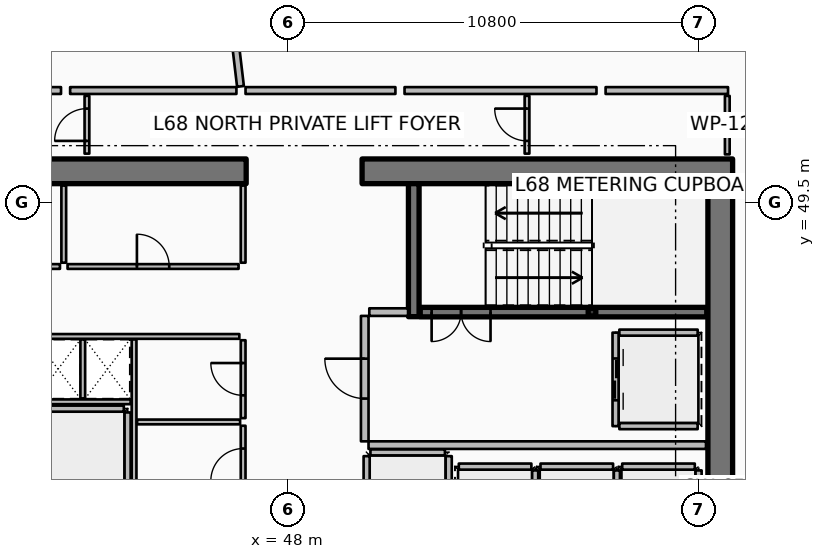
"""IFC4 building model, lengths in metres.
Left out: names, types, materials, properties, quantities, classifications, styles, units other than length and angle.
Written with IfcOpenShell. Run it as: python <this file> out.ifc"""

import sys

from ifc_helpers import new_model, si_unit, direction, frame, frame_2d, origin, origin_2d, place, context, subcontext, project, spatial, rectangle, hollow_rectangle, extrude, element, fill, save


model = new_model("IFC4")
c1 = context("Model", 3, precision=1e-05, world=origin(), true_north=direction((0.0, 1.0)))
c2 = subcontext(c1, "Body", "Model", "MODEL_VIEW")
j1 = project(units=[si_unit("LENGTHUNIT", "METRE"), si_unit("PLANEANGLEUNIT", "RADIAN")], contexts=[c1])
p1 = place(None, origin())
s1 = spatial("IfcSite", under=j1, at=p1, CompositionType="ELEMENT")
p2 = place(p1, origin())
s2 = spatial("IfcBuilding", under=s1, at=p2, CompositionType="ELEMENT")
p3 = place(p2, frame((0.0, 0.0, 271.35)))
s3 = spatial("IfcBuildingStorey", under=s2, at=p3, CompositionType="ELEMENT", Elevation=271.35)
for number, where, z_axis, x_axis in (
    (1, (37.15, 50.325, 0.0), (0.0, 0.0, 1.0), (1.0, 0.0, 0.0)),
    (2, (49.95, 50.325, 0.0), (0.0, 0.0, 1.0), (1.0, 0.0, 0.0)),
):
    element("IfcWall", number, at=place(p3, frame(where, z_axis=z_axis, x_axis=x_axis)), inside=s3, PredefinedType="SHEAR", context=c2, shape_type="SweptSolid", body=[
        extrude(rectangle(XDim=9.75, YDim=0.65, at=frame_2d((4.875, 0.0))), origin(), (0.0, 0.0, 1.0), 3.85),
    ])
p4 = place(p3, frame((59.375, 34.0, 0.0), z_axis=(0.0, 0.0, 1.0), x_axis=(0.0, 1.0, 0.0)))
e3 = element("IfcWall", 3, at=p4, inside=s3, PredefinedType="SHEAR", context=c2, shape_type="SweptSolid", body=[
    extrude(rectangle(XDim=16.0, YDim=0.65, at=frame_2d((8.0, 0.0))), origin(), (0.0, 0.0, 1.0), 3.85),
])
p5 = place(p3, frame((51.31, 46.5, 0.0), z_axis=(0.0, 0.0, 1.0), x_axis=(0.0, 1.0, 0.0)))
e4 = element("IfcWall", 4, at=p5, inside=s3, PredefinedType="SHEAR", context=c2, shape_type="SweptSolid", body=[
    extrude(rectangle(XDim=3.5, YDim=0.28, at=frame_2d((1.75, 0.0))), origin(), (0.0, 0.0, 1.0), 3.85),
])
p6 = place(p3, frame((56.0, 46.62, 0.0), z_axis=(0.0, 0.0, 1.0), x_axis=(1.0, 0.0, 0.0)))
e5 = element("IfcColumn", 5, at=p6, inside=s3, PredefinedType="COLUMN", context=c2, shape_type="SweptSolid", body=[
    extrude(hollow_rectangle(XDim=0.2, YDim=0.2, WallThickness=0.01, InnerFilletRadius=0.01, OuterFilletRadius=0.02, at=origin_2d()), origin(), (0.0, 0.0, 1.0), 1.72),
])
p7 = place(p3, frame((51.48, 46.62, 0.0), z_axis=(0.0, 0.0, 1.0), x_axis=(1.0, 0.0, 0.0)))
e6 = element("IfcWall", 6, at=p7, inside=s3, PredefinedType="SOLIDWALL", context=c2, shape_type="SweptSolid", body=[
    extrude(rectangle(XDim=7.54, YDim=0.25, at=frame_2d((3.77, 0.0))), origin(), (0.0, 0.0, 1.0), 3.59),
])
p8 = place(p7, frame((0.3, 0.0, 0.0)))
e7 = element("IfcOpeningElement", 7, at=p8, cuts=e6, PredefinedType="OPENING", context=c2, shape_type="SweptSolid", body=[
    extrude(rectangle(XDim=1.55, YDim=2.15, at=frame_2d((0.775, 1.075))), frame((0.0, 0.135, 0.0), z_axis=(0.0, -1.0, 0.0), x_axis=(1.0, 0.0, 0.0)), (0.0, 0.0, 1.0), 0.27),
])
p9 = place(p3, frame((54.505, 40.845, 0.0), z_axis=(0.0, 0.0, 1.0), x_axis=(0.0, 1.0, 0.0)))
e8 = element("IfcWall", 8, at=p9, inside=s3, PredefinedType="PARTITIONING", context=c2, shape_type="SweptSolid", body=[
    extrude(rectangle(XDim=1.61, YDim=0.16, at=frame_2d((0.805, 0.0))), origin(), (0.0, 0.0, 1.0), 3.59),
])
p10 = place(p3, frame((52.495, 42.555, 0.0), z_axis=(0.0, 0.0, 1.0), x_axis=(1.0, 0.0, 0.0)))
e9 = element("IfcWall", 9, at=p10, inside=s3, PredefinedType="PARTITIONING", context=c2, shape_type="SweptSolid", body=[
    extrude(rectangle(XDim=1.91, YDim=0.16, at=frame_2d((0.955, 0.0))), origin(), (0.0, 0.0, 1.0), 3.59),
])
p11 = place(p3, frame((56.655, 40.845, 0.0), z_axis=(0.0, 0.0, 1.0), x_axis=(0.0, 1.0, 0.0)))
e10 = element("IfcWall", 10, at=p11, inside=s3, PredefinedType="PARTITIONING", context=c2, shape_type="SweptSolid", body=[
    extrude(rectangle(XDim=1.61, YDim=0.16, at=frame_2d((0.805, 0.0))), origin(), (0.0, 0.0, 1.0), 3.59),
])
p12 = place(p3, frame((54.645, 42.555, 0.0), z_axis=(0.0, 0.0, 1.0), x_axis=(1.0, 0.0, 0.0)))
e11 = element("IfcWall", 11, at=p12, inside=s3, PredefinedType="PARTITIONING", context=c2, shape_type="SweptSolid", body=[
    extrude(rectangle(XDim=1.91, YDim=0.16, at=frame_2d((0.955, 0.0))), origin(), (0.0, 0.0, 1.0), 3.59),
])
p13 = place(p3, frame((58.805, 40.845, 0.0), z_axis=(0.0, 0.0, 1.0), x_axis=(0.0, 1.0, 0.0)))
e12 = element("IfcWall", 12, at=p13, inside=s3, PredefinedType="PARTITIONING", context=c2, shape_type="SweptSolid", body=[
    extrude(rectangle(XDim=1.61, YDim=0.16, at=frame_2d((0.805, 0.0))), origin(), (0.0, 0.0, 1.0), 3.59),
])
p14 = place(p3, frame((56.795, 42.555, 0.0), z_axis=(0.0, 0.0, 1.0), x_axis=(1.0, 0.0, 0.0)))
e13 = element("IfcWall", 13, at=p14, inside=s3, PredefinedType="PARTITIONING", context=c2, shape_type="SweptSolid", body=[
    extrude(rectangle(XDim=1.91, YDim=0.16, at=frame_2d((0.955, 0.0))), origin(), (0.0, 0.0, 1.0), 3.59),
])
p15 = place(p3, frame((43.78, 41.72, 0.0), z_axis=(0.0, 0.0, 1.0), x_axis=(0.0, 1.0, 0.0)))
e14 = element("IfcWall", 14, at=p15, inside=s3, PredefinedType="PARTITIONING", context=c2, shape_type="SweptSolid", body=[
    extrude(rectangle(XDim=2.26, YDim=0.16, at=frame_2d((1.13, 0.0))), origin(), (0.0, 0.0, 1.0), 3.59),
])
p16 = place(p3, frame((41.62, 44.08, 0.0), z_axis=(0.0, 0.0, 1.0), x_axis=(1.0, 0.0, 0.0)))
e15 = element("IfcWall", 15, at=p16, inside=s3, PredefinedType="PARTITIONING", context=c2, shape_type="SweptSolid", body=[
    extrude(rectangle(XDim=2.06, YDim=0.16, at=frame_2d((1.03, 0.0))), origin(), (0.0, 0.0, 1.0), 3.59),
])
p17 = place(p3, frame((56.62, 46.08, 0.0), z_axis=(0.0, 0.0, 1.0), x_axis=(0.0, -1.0, 0.0)))
e16 = element("IfcWall", 16, at=p17, inside=s3, PredefinedType="PARTITIONING", context=c2, shape_type="SweptSolid", body=[
    extrude(rectangle(XDim=2.46, YDim=0.16, at=frame_2d((1.23, 0.0))), origin(), (0.0, 0.0, 1.0), 3.59),
])
p18 = place(p17, frame((0.68, 0.0, 0.0)))
e17 = element("IfcOpeningElement", 17, at=p18, cuts=e16, PredefinedType="OPENING", context=c2, shape_type="SweptSolid", body=[
    extrude(rectangle(XDim=1.1, YDim=2.1, at=frame_2d((0.55, 1.05))), frame((0.0, 0.09, 0.0), z_axis=(0.0, -1.0, 0.0), x_axis=(1.0, 0.0, 0.0)), (0.0, 0.0, 1.0), 0.18),
])
for number, where, z_axis, x_axis in (
    (18, (56.72, 46.08, 0.0), (0.0, 0.0, 1.0), (1.0, 0.0, 0.0)),
    (19, (56.72, 43.62, 0.0), (0.0, 0.0, 1.0), (1.0, 0.0, 0.0)),
):
    element("IfcWall", number, at=place(p3, frame(where, z_axis=z_axis, x_axis=x_axis)), inside=s3, PredefinedType="PARTITIONING", context=c2, shape_type="SweptSolid", body=[
        extrude(rectangle(XDim=2.06, YDim=0.16, at=frame_2d((1.03, 0.0))), origin(), (0.0, 0.0, 1.0), 3.59),
    ])
for number, where, z_axis, x_axis in (
    (20, (52.23, 40.67, 0.0), (0.0, 0.0, 1.0), (0.0, 1.0, 0.0)),
    (21, (50.07, 40.67, 0.0), (0.0, 0.0, 1.0), (0.0, 1.0, 0.0)),
):
    element("IfcWall", number, at=place(p3, frame(where, z_axis=z_axis, x_axis=x_axis)), inside=s3, PredefinedType="PARTITIONING", context=c2, shape_type="SweptSolid", body=[
        extrude(rectangle(XDim=2.16, YDim=0.16, at=frame_2d((1.08, 0.0))), origin(), (0.0, 0.0, 1.0), 3.59),
    ])
p19 = place(p3, frame((50.17, 42.93, 0.0), z_axis=(0.0, 0.0, 1.0), x_axis=(1.0, 0.0, 0.0)))
e22 = element("IfcWall", 22, at=p19, inside=s3, PredefinedType="PARTITIONING", context=c2, shape_type="SweptSolid", body=[
    extrude(rectangle(XDim=1.96, YDim=0.16, at=frame_2d((0.98, 0.0))), origin(), (0.0, 0.0, 1.0), 3.59),
])
for number, where, z_axis, x_axis in (
    (23, (46.82, 47.92, 0.0), (0.0, 0.0, 1.0), (0.0, 1.0, 0.0)),
    (24, (42.1, 47.92, 0.0), (0.0, 0.0, 1.0), (0.0, 1.0, 0.0)),
):
    element("IfcWall", number, at=place(p3, frame(where, z_axis=z_axis, x_axis=x_axis)), inside=s3, PredefinedType="PARTITIONING", context=c2, shape_type="SweptSolid", body=[
        extrude(rectangle(XDim=2.03, YDim=0.125, at=frame_2d((1.015, 0.0))), origin(), (0.0, 0.0, 1.0), 3.03),
    ])
p20 = place(p3, frame((37.92, 47.82, 0.0), z_axis=(0.0, 0.0, 1.0), x_axis=(1.0, 0.0, 0.0)))
e25 = element("IfcWall", 25, at=p20, inside=s3, PredefinedType="PARTITIONING", context=c2, shape_type="SweptSolid", body=[
    extrude(rectangle(XDim=4.08, YDim=0.125, at=frame_2d((2.04, 0.0))), origin(), (0.0, 0.0, 1.0), 3.03),
])
p21 = place(p20, frame((1.615, 0.0, 0.0)))
e26 = element("IfcOpeningElement", 26, at=p21, cuts=e25, PredefinedType="OPENING", context=c2, shape_type="SweptSolid", body=[
    extrude(rectangle(XDim=0.85, YDim=2.06, at=frame_2d((0.425, 1.03))), frame((0.0, 0.073, 0.0), z_axis=(0.0, -1.0, 0.0), x_axis=(1.0, 0.0, 0.0)), (0.0, 0.0, 1.0), 0.145),
])
p22 = place(p3, frame((42.2, 47.82, 0.0), z_axis=(0.0, 0.0, 1.0), x_axis=(1.0, 0.0, 0.0)))
e27 = element("IfcWall", 27, at=p22, inside=s3, PredefinedType="PARTITIONING", context=c2, shape_type="SweptSolid", body=[
    extrude(rectangle(XDim=4.5, YDim=0.125, at=frame_2d((2.25, 0.0))), origin(), (0.0, 0.0, 1.0), 3.03),
])
p23 = place(p22, frame((1.825, 0.0, 0.0)))
e28 = element("IfcOpeningElement", 28, at=p23, cuts=e27, PredefinedType="OPENING", context=c2, shape_type="SweptSolid", body=[
    extrude(rectangle(XDim=0.85, YDim=2.06, at=frame_2d((0.425, 1.03))), frame((0.0, 0.073, 0.0), z_axis=(0.0, -1.0, 0.0), x_axis=(1.0, 0.0, 0.0)), (0.0, 0.0, 1.0), 0.145),
])
p24 = place(p3, frame((50.12, 43.12, 0.0), z_axis=(0.0, 0.0, 1.0), x_axis=(1.0, 0.0, 0.0)))
e29 = element("IfcWall", 29, at=p24, inside=s3, PredefinedType="PARTITIONING", context=c2, shape_type="SweptSolid", body=[
    extrude(rectangle(XDim=8.88, YDim=0.2, at=frame_2d((4.44, 0.0))), origin(), (0.0, 0.0, 1.0), 3.59),
])
p25 = place(p3, frame((50.14, 46.62, 0.0), z_axis=(0.0, 0.0, 1.0), x_axis=(1.0, 0.0, 0.0)))
e30 = element("IfcWall", 30, at=p25, inside=s3, PredefinedType="PARTITIONING", context=c2, shape_type="SweptSolid", body=[
    extrude(rectangle(XDim=1.02, YDim=0.2, at=frame_2d((0.51, 0.0))), origin(), (0.0, 0.0, 1.0), 3.59),
])
p26 = place(p3, frame((50.02, 43.22, 0.0), z_axis=(0.0, 0.0, 1.0), x_axis=(0.0, 1.0, 0.0)))
e31 = element("IfcWall", 31, at=p26, inside=s3, PredefinedType="PARTITIONING", context=c2, shape_type="SweptSolid", body=[
    extrude(rectangle(XDim=3.3, YDim=0.2, at=frame_2d((1.65, 0.0))), origin(), (0.0, 0.0, 1.0), 3.59),
])
p27 = place(p26, frame((1.125, 0.0, 0.0)))
e32 = element("IfcOpeningElement", 32, at=p27, cuts=e31, PredefinedType="OPENING", context=c2, shape_type="SweptSolid", body=[
    extrude(rectangle(XDim=1.05, YDim=2.1, at=frame_2d((0.525, 1.05))), frame((0.0, 0.11, 0.0), z_axis=(0.0, -1.0, 0.0), x_axis=(1.0, 0.0, 0.0)), (0.0, 0.0, 1.0), 0.22),
])
p28 = place(p3, frame((41.36, 45.98, 0.0), z_axis=(0.0, 0.0, 1.0), x_axis=(1.0, 0.0, 0.0)))
e33 = element("IfcWall", 33, at=p28, inside=s3, PredefinedType="PARTITIONING", context=c2, shape_type="SweptSolid", body=[
    extrude(rectangle(XDim=5.36, YDim=0.125, at=frame_2d((2.68, 0.0))), origin(), (0.0, 0.0, 1.0), 3.03),
])
p29 = place(p3, frame((41.36, 44.26, 0.0), z_axis=(0.0, 0.0, 1.0), x_axis=(1.0, 0.0, 0.0)))
e34 = element("IfcWall", 34, at=p29, inside=s3, PredefinedType="PARTITIONING", context=c2, shape_type="SweptSolid", body=[
    extrude(rectangle(XDim=2.5, YDim=0.125, at=frame_2d((1.25, 0.0))), origin(), (0.0, 0.0, 1.0), 3.03),
])
p30 = place(p3, frame((42.6, 44.35, 0.0), z_axis=(0.0, 0.0, 1.0), x_axis=(0.0, 1.0, 0.0)))
e35 = element("IfcWall", 35, at=p30, inside=s3, PredefinedType="PARTITIONING", context=c2, shape_type="SweptSolid", body=[
    extrude(rectangle(XDim=1.55, YDim=0.125, at=frame_2d((0.775, 0.0))), origin(), (0.0, 0.0, 1.0), 3.03),
])
p31 = place(p3, frame((43.95, 41.58, 0.0), z_axis=(0.0, 0.0, 1.0), x_axis=(0.0, 1.0, 0.0)))
e36 = element("IfcWall", 36, at=p31, inside=s3, PredefinedType="PARTITIONING", context=c2, shape_type="SweptSolid", body=[
    extrude(rectangle(XDim=4.32, YDim=0.125, at=frame_2d((2.16, 0.0))), origin(), (0.0, 0.0, 1.0), 3.03),
])
p32 = place(p3, frame((44.03, 43.73, 0.0), z_axis=(0.0, 0.0, 1.0), x_axis=(1.0, 0.0, 0.0)))
e37 = element("IfcWall", 37, at=p32, inside=s3, PredefinedType="PARTITIONING", context=c2, shape_type="SweptSolid", body=[
    extrude(rectangle(XDim=2.71, YDim=0.125, at=frame_2d((1.355, 0.0))), origin(), (0.0, 0.0, 1.0), 3.03),
])
p33 = place(p3, frame((46.82, 41.58, 0.0), z_axis=(0.0, 0.0, 1.0), x_axis=(0.0, 1.0, 0.0)))
e38 = element("IfcWall", 38, at=p33, inside=s3, PredefinedType="PARTITIONING", context=c2, shape_type="SweptSolid", body=[
    extrude(rectangle(XDim=2.05, YDim=0.125, at=frame_2d((1.025, 0.0))), origin(), (0.0, 0.0, 1.0), 3.03),
])
p34 = place(p33, frame((0.6, 0.0, 0.0)))
e39 = element("IfcOpeningElement", 39, at=p34, cuts=e38, PredefinedType="OPENING", context=c2, shape_type="SweptSolid", body=[
    extrude(rectangle(XDim=0.85, YDim=2.06, at=frame_2d((0.425, 1.03))), frame((0.0, 0.073, 0.0), z_axis=(0.0, -1.0, 0.0), x_axis=(1.0, 0.0, 0.0)), (0.0, 0.0, 1.0), 0.145),
])
p35 = place(p3, frame((46.82, 43.83, 0.0), z_axis=(0.0, 0.0, 1.0), x_axis=(0.0, 1.0, 0.0)))
e40 = element("IfcWall", 40, at=p35, inside=s3, PredefinedType="PARTITIONING", context=c2, shape_type="SweptSolid", body=[
    extrude(rectangle(XDim=2.05, YDim=0.125, at=frame_2d((1.025, 0.0))), origin(), (0.0, 0.0, 1.0), 3.03),
])
p36 = place(p35, frame((0.6, 0.0, 0.0)))
e41 = element("IfcOpeningElement", 41, at=p36, cuts=e40, PredefinedType="OPENING", context=c2, shape_type="SweptSolid", body=[
    extrude(rectangle(XDim=0.85, YDim=2.06, at=frame_2d((0.425, 1.03))), frame((0.0, 0.073, 0.0), z_axis=(0.0, -1.0, 0.0), x_axis=(1.0, 0.0, 0.0)), (0.0, 0.0, 1.0), 0.145),
])
p37 = place(p3, frame((59.56, 50.77, 0.0), z_axis=(0.0, 0.0, 1.0), x_axis=(0.0, 1.0, 0.0)))
e42 = element("IfcWall", 42, at=p37, inside=s3, PredefinedType="PARTITIONING", context=c2, shape_type="SweptSolid", body=[
    extrude(rectangle(XDim=1.54, YDim=0.125, at=frame_2d((0.77, 0.0))), origin(), (0.0, 0.0, 1.0), 3.03),
])
p38 = place(p3, frame((42.71, 50.79, 0.0), z_axis=(0.0, 0.0, 1.0), x_axis=(0.0, 1.0, 0.0)))
e43 = element("IfcWall", 43, at=p38, inside=s3, PredefinedType="PARTITIONING", context=c2, shape_type="SweptSolid", body=[
    extrude(rectangle(XDim=1.52, YDim=0.125, at=frame_2d((0.76, 0.0))), origin(), (0.0, 0.0, 1.0), 2.957),
])
p39 = place(p38, frame((0.335, 0.0, 0.0)))
e44 = element("IfcOpeningElement", 44, at=p39, cuts=e43, PredefinedType="OPENING", context=c2, shape_type="SweptSolid", body=[
    extrude(rectangle(XDim=0.85, YDim=2.06, at=frame_2d((0.425, 1.03))), frame((0.0, 0.073, 0.0), z_axis=(0.0, -1.0, 0.0), x_axis=(1.0, 0.0, 0.0)), (0.0, 0.0, 1.0), 0.145),
])
p40 = place(p3, frame((54.29, 50.79, 0.0), z_axis=(0.0, 0.0, 1.0), x_axis=(0.0, 1.0, 0.0)))
e45 = element("IfcWall", 45, at=p40, inside=s3, PredefinedType="PARTITIONING", context=c2, shape_type="SweptSolid", body=[
    extrude(rectangle(XDim=1.52, YDim=0.125, at=frame_2d((0.76, 0.0))), origin(), (0.0, 0.0, 1.0), 3.03),
])
p41 = place(p40, frame((0.335, 0.0, 0.0)))
e46 = element("IfcOpeningElement", 46, at=p41, cuts=e45, PredefinedType="OPENING", context=c2, shape_type="SweptSolid", body=[
    extrude(rectangle(XDim=0.85, YDim=2.06, at=frame_2d((0.425, 1.03))), frame((0.0, 0.073, 0.0), z_axis=(0.0, -1.0, 0.0), x_axis=(1.0, 0.0, 0.0)), (0.0, 0.0, 1.0), 0.145),
])
p42 = place(p3, frame((46.75, 52.559, 0.0), z_axis=(0.0, 0.0, 1.0), x_axis=(-0.117540318076, 0.993068111273, 0.0)))
e47 = element("IfcWall", 47, at=p42, inside=s3, PredefinedType="PARTITIONING", context=c2, shape_type="SweptSolid", body=[
    extrude(rectangle(XDim=14.062, YDim=0.18, at=frame_2d((7.031, 0.0))), origin(), (0.0, 0.0, 1.0), 2.957),
])
p43 = place(p3, frame((46.643, 52.45, 0.0), z_axis=(0.0, 0.0, 1.0), x_axis=(-1.0, 0.0, 0.0)))
e48 = element("IfcWall", 48, at=p43, inside=s3, PredefinedType="PARTITIONING", context=c2, shape_type="SweptSolid", body=[
    extrude(rectangle(XDim=4.376, YDim=0.18, at=frame_2d((2.188, 0.0))), origin(), (0.0, 0.0, 1.0), 2.957),
])
p44 = place(p3, frame((42.028, 52.45, 0.0), z_axis=(0.0, 0.0, 1.0), x_axis=(-1.0, 0.0, 0.0)))
e49 = element("IfcWall", 49, at=p44, inside=s3, PredefinedType="PARTITIONING", context=c2, shape_type="SweptSolid", body=[
    extrude(rectangle(XDim=4.758, YDim=0.18, at=frame_2d((2.379, 0.0))), origin(), (0.0, 0.0, 1.0), 2.957),
])
p45 = place(p3, frame((59.58, 52.45, 0.0), z_axis=(0.0, 0.0, 1.0), x_axis=(-1.0, 0.0, 0.0)))
e50 = element("IfcWall", 50, at=p45, inside=s3, PredefinedType="PARTITIONING", context=c2, shape_type="SweptSolid", body=[
    extrude(rectangle(XDim=3.222, YDim=0.18, at=frame_2d((1.611, 0.0))), origin(), (0.0, 0.0, 1.0), 2.957),
])
p46 = place(p3, frame((56.118, 52.45, 0.0), z_axis=(0.0, 0.0, 1.0), x_axis=(-1.0, 0.0, 0.0)))
e51 = element("IfcWall", 51, at=p46, inside=s3, PredefinedType="PARTITIONING", context=c2, shape_type="SweptSolid", body=[
    extrude(rectangle(XDim=5.051, YDim=0.18, at=frame_2d((2.525, 0.0))), origin(), (0.0, 0.0, 1.0), 2.957),
])
p47 = place(p3, frame((50.827, 52.45, 0.0), z_axis=(0.0, 0.0, 1.0), x_axis=(-1.0, 0.0, 0.0)))
e52 = element("IfcWall", 52, at=p47, inside=s3, PredefinedType="PARTITIONING", context=c2, shape_type="SweptSolid", body=[
    extrude(rectangle(XDim=3.944, YDim=0.18, at=frame_2d((1.972, 0.0))), origin(), (0.0, 0.0, 1.0), 2.957),
])
p48 = place(p8, origin())
e53 = element("IfcDoor", 53, at=p48, inside=s3, OperationType="DOUBLE_DOOR_SINGLE_SWING", PredefinedType="DOOR", context=c2, shape_type="SweptSolid", body=[
    extrude(rectangle(XDim=1.55, YDim=2.15, at=frame_2d((0.775, 1.075))), frame((0.0, 0.025, 0.0), z_axis=(0.0, -1.0, 0.0), x_axis=(1.0, 0.0, 0.0)), (0.0, 0.0, 1.0), 0.05),
])
fill(e7, e53)
p49 = place(p18, origin())
e54 = element("IfcDoor", 54, at=p49, inside=s3, OperationType="DOUBLE_DOOR_SLIDING", PredefinedType="DOOR", context=c2, shape_type="SweptSolid", body=[
    extrude(rectangle(XDim=1.1, YDim=2.1, at=frame_2d((0.55, 1.05))), frame((0.0, 0.025, 0.0), z_axis=(0.0, -1.0, 0.0), x_axis=(1.0, 0.0, 0.0)), (0.0, 0.0, 1.0), 0.05),
])
fill(e17, e54)
p50 = place(p23, origin())
e55 = element("IfcDoor", 55, at=p50, inside=s3, OperationType="SINGLE_SWING_LEFT", PredefinedType="DOOR", context=c2, shape_type="SweptSolid", body=[
    extrude(rectangle(XDim=0.85, YDim=2.06, at=frame_2d((0.425, 1.03))), frame((0.0, 0.025, 0.0), z_axis=(0.0, -1.0, 0.0), x_axis=(1.0, 0.0, 0.0)), (0.0, 0.0, 1.0), 0.05),
])
fill(e28, e55)
p51 = place(p27, origin())
e56 = element("IfcDoor", 56, at=p51, inside=s3, OperationType="SINGLE_SWING_RIGHT", PredefinedType="DOOR", context=c2, shape_type="SweptSolid", body=[
    extrude(rectangle(XDim=1.05, YDim=2.1, at=frame_2d((0.525, 1.05))), frame((0.0, 0.025, 0.0), z_axis=(0.0, -1.0, 0.0), x_axis=(1.0, 0.0, 0.0)), (0.0, 0.0, 1.0), 0.05),
])
fill(e32, e56)
p52 = place(p34, origin())
e57 = element("IfcDoor", 57, at=p52, inside=s3, OperationType="SINGLE_SWING_LEFT", PredefinedType="DOOR", context=c2, shape_type="SweptSolid", body=[
    extrude(rectangle(XDim=0.85, YDim=2.06, at=frame_2d((0.425, 1.03))), frame((0.0, 0.025, 0.0), z_axis=(0.0, -1.0, 0.0), x_axis=(1.0, 0.0, 0.0)), (0.0, 0.0, 1.0), 0.05),
])
fill(e39, e57)
p53 = place(p36, origin())
e58 = element("IfcDoor", 58, at=p53, inside=s3, OperationType="SINGLE_SWING_RIGHT", PredefinedType="DOOR", context=c2, shape_type="SweptSolid", body=[
    extrude(rectangle(XDim=0.85, YDim=2.06, at=frame_2d((0.425, 1.03))), frame((0.0, 0.025, 0.0), z_axis=(0.0, -1.0, 0.0), x_axis=(1.0, 0.0, 0.0)), (0.0, 0.0, 1.0), 0.05),
])
fill(e41, e58)
p54 = place(p39, origin())
e59 = element("IfcDoor", 59, at=p54, inside=s3, OperationType="SINGLE_SWING_LEFT", PredefinedType="DOOR", context=c2, shape_type="SweptSolid", body=[
    extrude(rectangle(XDim=0.85, YDim=2.06, at=frame_2d((0.425, 1.03))), frame((0.0, 0.025, 0.0), z_axis=(0.0, -1.0, 0.0), x_axis=(1.0, 0.0, 0.0)), (0.0, 0.0, 1.0), 0.05),
])
fill(e44, e59)
p55 = place(p41, origin())
e60 = element("IfcDoor", 60, at=p55, inside=s3, OperationType="SINGLE_SWING_RIGHT", PredefinedType="DOOR", context=c2, shape_type="SweptSolid", body=[
    extrude(rectangle(XDim=0.85, YDim=2.06, at=frame_2d((0.425, 1.03))), frame((0.0, 0.025, 0.0), z_axis=(0.0, -1.0, 0.0), x_axis=(1.0, 0.0, 0.0)), (0.0, 0.0, 1.0), 0.05),
])
fill(e46, e60)
save(model, sys.argv[1])
